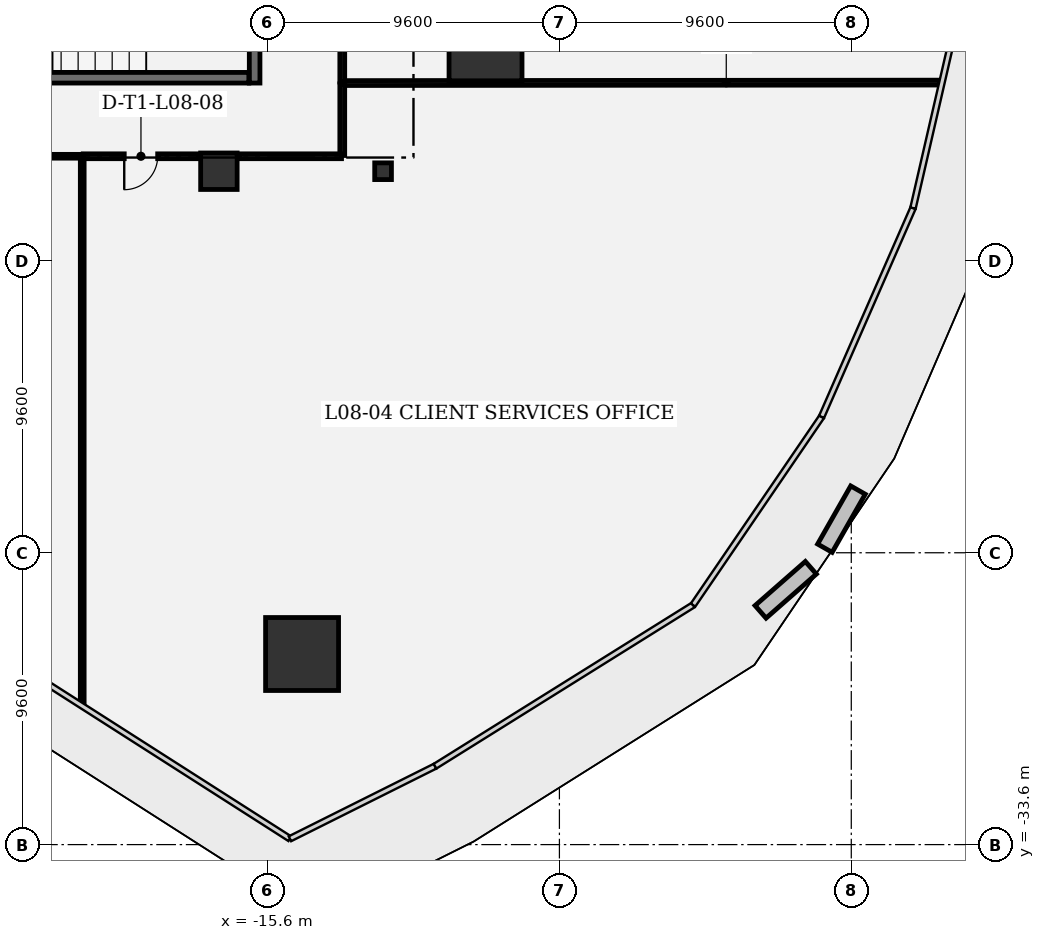
"""IFC4 building model, lengths in metres.
Left out: names, types, materials, properties, quantities, classifications, styles, units other than length and angle.
Written with IfcOpenShell. Run it as: python <this file> out.ifc"""

import sys

from ifc_helpers import new_model, si_unit, direction, frame, frame_2d, origin, origin_2d, place, context, subcontext, project, spatial, rectangle, extrude, element, fill, save


model = new_model("IFC4")
c1 = context("Model", 3, precision=1e-05, world=origin(), true_north=direction((0.0, 1.0)))
c2 = subcontext(c1, "Body", "Model", "MODEL_VIEW")
j1 = project(units=[si_unit("LENGTHUNIT", "METRE"), si_unit("PLANEANGLEUNIT", "RADIAN")], contexts=[c1])
p1 = place(None, origin())
s1 = spatial("IfcSite", under=j1, at=p1, CompositionType="ELEMENT")
p2 = place(p1, origin())
s2 = spatial("IfcBuilding", under=s1, at=p2, CompositionType="ELEMENT")
p3 = place(p2, frame((0.0, 0.0, 40.8)))
s3 = spatial("IfcBuildingStorey", under=s2, at=p3, CompositionType="ELEMENT", Elevation=40.8)
for number, where, z_axis, x_axis in (
    (1, (-14.464, -27.331, 0.0), (0.0, 0.0, 1.0), (1.0, 0.0, 0.0)),
    (2, (-8.43, -7.276, 0.0), (0.0, 0.0, 1.0), (1.0, 0.0, 0.0)),
):
    element("IfcColumn", number, at=place(p3, frame(where, z_axis=z_axis, x_axis=x_axis)), inside=s3, PredefinedType="COLUMN", context=c2, shape_type="SweptSolid", body=[
        extrude(rectangle(XDim=2.4, YDim=2.4, at=origin_2d()), origin(), (0.0, 0.0, 1.0), 4.2),
    ])
p4 = place(p3, frame((-17.2, -11.45, 0.0), z_axis=(0.0, 0.0, 1.0), x_axis=(1.0, 0.0, 0.0)))
e3 = element("IfcColumn", 3, at=p4, inside=s3, PredefinedType="COLUMN", context=c2, shape_type="SweptSolid", body=[
    extrude(rectangle(XDim=1.2, YDim=1.2, at=origin_2d()), origin(), (0.0, 0.0, 1.0), 4.2),
])
p5 = place(p3, frame((-11.8, -11.45, 0.0), z_axis=(0.0, 0.0, 1.0), x_axis=(1.0, 0.0, 0.0)))
e4 = element("IfcColumn", 4, at=p5, inside=s3, PredefinedType="COLUMN", context=c2, shape_type="SweptSolid", body=[
    extrude(rectangle(XDim=0.55, YDim=0.55, at=origin_2d()), origin(), (0.0, 0.0, 1.0), 4.2),
])
p6 = place(p3, frame((-16.025, -8.55, 0.0), z_axis=(0.0, 0.0, 1.0), x_axis=(0.0, 1.0, 0.0)))
e5 = element("IfcWall", 5, at=p6, inside=s3, PredefinedType="SHEAR", context=c2, shape_type="SweptSolid", body=[
    extrude(rectangle(XDim=4.61, YDim=0.35, at=frame_2d((2.305, 0.0))), origin(), (0.0, 0.0, 1.0), 3.92),
])
p7 = place(p3, frame((-24.335, -8.375, 0.0), z_axis=(0.0, 0.0, 1.0), x_axis=(1.0, 0.0, 0.0)))
e6 = element("IfcWall", 6, at=p7, inside=s3, PredefinedType="SHEAR", context=c2, shape_type="SweptSolid", body=[
    extrude(rectangle(XDim=8.12, YDim=0.35, at=frame_2d((4.06, 0.0))), origin(), (0.0, 0.0, 1.0), 3.92),
])
p8 = place(p7, frame((0.28, 0.0, 0.0)))
e7 = element("IfcOpeningElement", 7, at=p8, cuts=e6, PredefinedType="OPENING", context=c2, shape_type="SweptSolid", body=[
    extrude(rectangle(XDim=1.1, YDim=2.2, at=frame_2d((0.55, 1.1))), frame((0.0, 0.185, 0.0), z_axis=(0.0, -1.0, 0.0), x_axis=(1.0, 0.0, 0.0)), (0.0, 0.0, 1.0), 0.37),
])
p9 = place(p3, frame((-21.695, -28.962, 0.0), z_axis=(0.0, 0.0, 1.0), x_axis=(0.0, 1.0, 0.0)))
e8 = element("IfcWall", 8, at=p9, inside=s3, PredefinedType="PARTITIONING", context=c2, shape_type="SweptSolid", body=[
    extrude(rectangle(XDim=17.979, YDim=0.125, at=frame_2d((8.99, 0.0))), origin(), (0.0, 0.0, 1.0), 2.957),
])
p10 = place(p3, frame((-21.72, -10.958, 0.0), z_axis=(0.0, 0.0, 1.0), x_axis=(-1.0, 0.0, 0.0)))
e9 = element("IfcWall", 9, at=p10, inside=s3, PredefinedType="PARTITIONING", context=c2, shape_type="SweptSolid", body=[
    extrude(rectangle(XDim=1.215, YDim=0.125, at=frame_2d((0.607, 0.0))), origin(), (0.0, 0.0, 1.0), 3.92),
])
p11 = place(p3, frame((6.502, -8.535, 0.0), z_axis=(0.0, 0.0, 1.0), x_axis=(-0.999999692694, -0.000783971885, 0.0)))
e10 = element("IfcWall", 10, at=p11, inside=s3, PredefinedType="PARTITIONING", context=c2, shape_type="SweptSolid", body=[
    extrude(rectangle(XDim=19.619, YDim=0.16, at=frame_2d((9.81, 0.0))), origin(), (0.0, 0.0, 1.0), 2.957),
])
p12 = place(p3, frame((-13.142, -8.575, 0.0), z_axis=(0.0, 0.0, 1.0), x_axis=(0.0, -1.0, 0.0)))
e11 = element("IfcWall", 11, at=p12, inside=s3, PredefinedType="PARTITIONING", context=c2, shape_type="SweptSolid", body=[
    extrude(rectangle(XDim=2.358, YDim=0.16, at=frame_2d((1.179, 0.0))), origin(), (0.0, 0.0, 1.0), 3.92),
])
p13 = place(p3, frame((-13.167, -10.958, 0.0), z_axis=(0.0, 0.0, 1.0), x_axis=(-1.0, 0.0, 0.0)))
e12 = element("IfcWall", 12, at=p13, inside=s3, PredefinedType="PARTITIONING", context=c2, shape_type="SweptSolid", body=[
    extrude(rectangle(XDim=3.368, YDim=0.16, at=frame_2d((1.684, 0.0))), origin(), (0.0, 0.0, 1.0), 2.957),
])
p14 = place(p3, frame((-17.865, -10.958, 0.0), z_axis=(0.0, 0.0, 1.0), x_axis=(-1.0, 0.0, 0.0)))
e13 = element("IfcWall", 13, at=p14, inside=s3, PredefinedType="PARTITIONING", context=c2, shape_type="SweptSolid", body=[
    extrude(rectangle(XDim=3.797, YDim=0.16, at=frame_2d((1.899, 0.0))), origin(), (0.0, 0.0, 1.0), 3.92),
])
p15 = place(p14, frame((1.349, 0.0, 0.0)))
e14 = element("IfcOpeningElement", 14, at=p15, cuts=e13, PredefinedType="OPENING", context=c2, shape_type="SweptSolid", body=[
    extrude(rectangle(XDim=1.1, YDim=2.15, at=frame_2d((0.55, 1.075))), frame((0.0, 0.09, 0.0), z_axis=(0.0, -1.0, 0.0), x_axis=(1.0, 0.0, 0.0)), (0.0, 0.0, 1.0), 0.18),
])
p16 = place(p3, frame((-13.142, 0.766, 0.0), z_axis=(0.0, 0.0, 1.0), x_axis=(0.0, -1.0, 0.0)))
e15 = element("IfcWall", 15, at=p16, inside=s3, PredefinedType="PARTITIONING", context=c2, shape_type="SweptSolid", body=[
    extrude(rectangle(XDim=9.283, YDim=0.16, at=frame_2d((4.642, 0.0))), origin(), (0.0, 0.0, 1.0), 3.92),
])
p17 = place(p16, frame((4.167, 0.0, 0.0)))
e16 = element("IfcOpeningElement", 16, at=p17, cuts=e15, PredefinedType="OPENING", context=c2, shape_type="SweptSolid", body=[
    extrude(rectangle(XDim=0.95, YDim=2.15, at=frame_2d((0.475, 1.075))), frame((0.0, 0.09, 0.0), z_axis=(0.0, -1.0, 0.0), x_axis=(1.0, 0.0, 0.0)), (0.0, 0.0, 1.0), 0.18),
])
p18 = place(p15, origin())
e17 = element("IfcDoor", 17, at=p18, inside=s3, OperationType="SINGLE_SWING_RIGHT", PredefinedType="DOOR", context=c2, shape_type="SweptSolid", body=[
    extrude(rectangle(XDim=1.1, YDim=2.15, at=frame_2d((0.55, 1.075))), frame((0.0, 0.025, 0.0), z_axis=(0.0, -1.0, 0.0), x_axis=(1.0, 0.0, 0.0)), (0.0, 0.0, 1.0), 0.05),
])
fill(e14, e17)
save(model, sys.argv[1])
